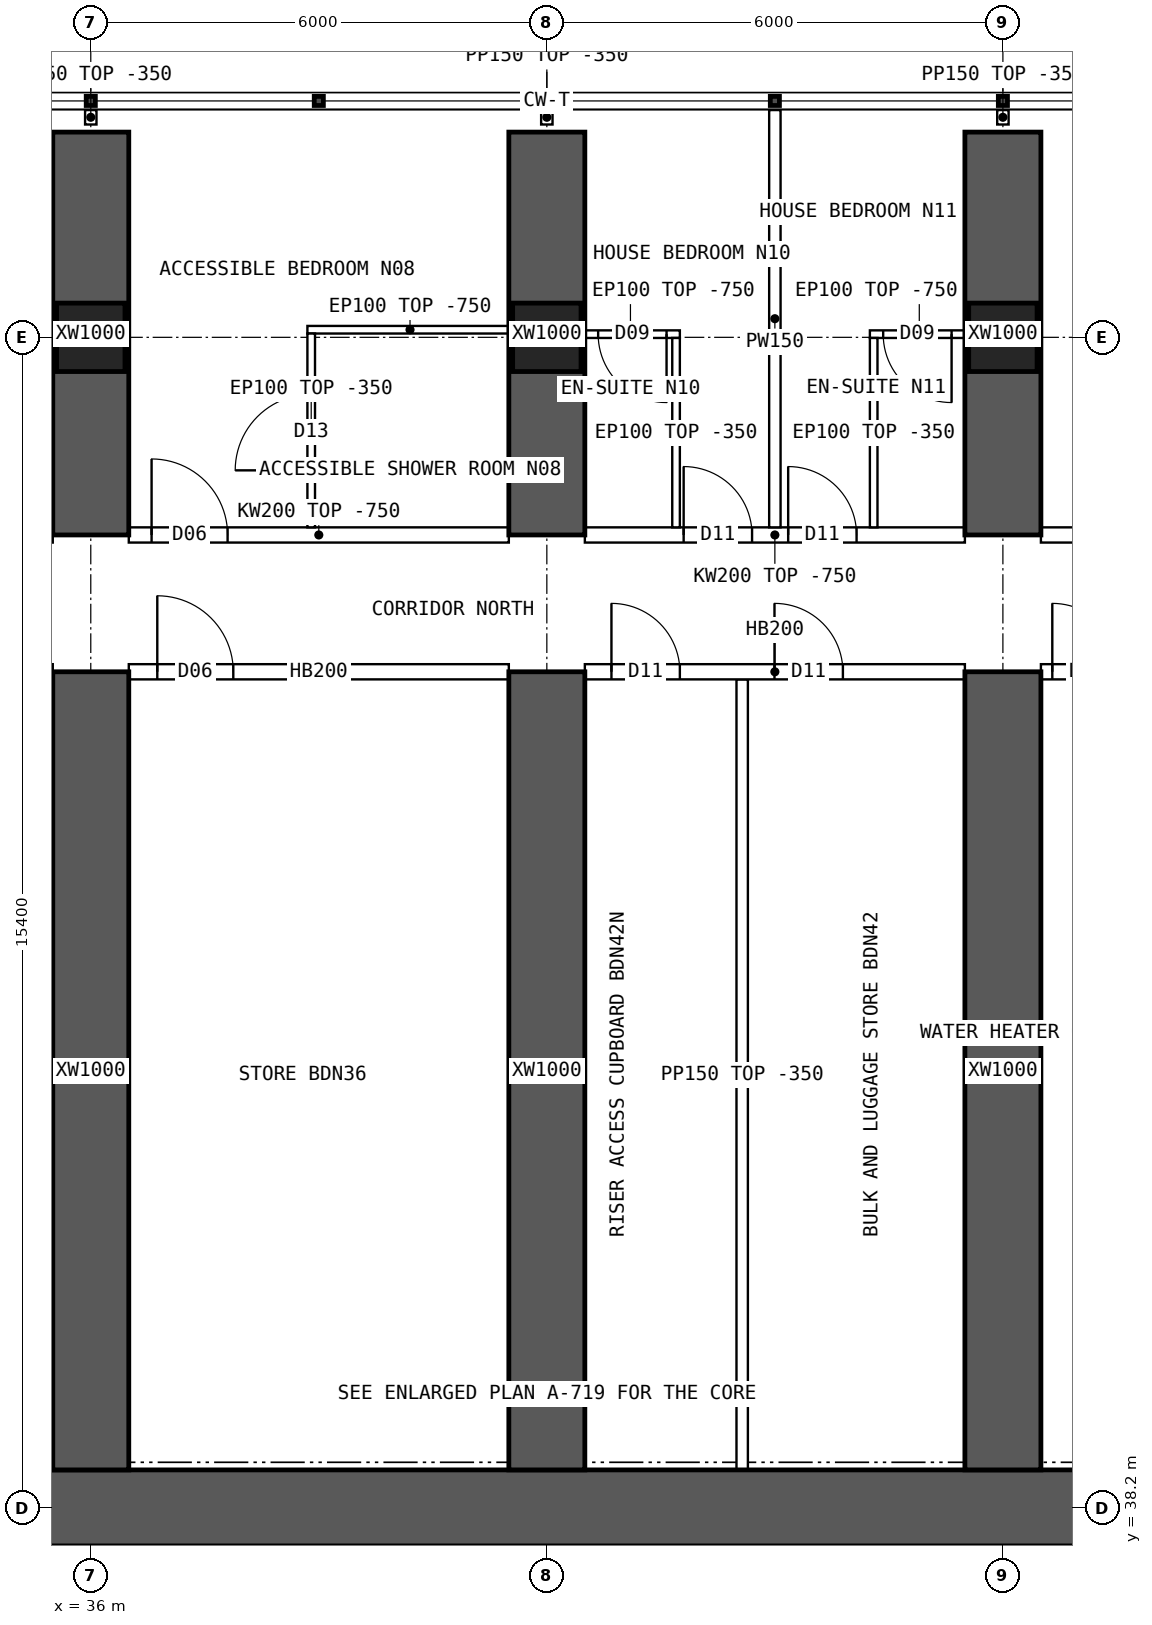
"""IFC4 building model, lengths in metres.
Left out: names, types, materials, properties, quantities, classifications, styles, units other than length and angle.
Written with IfcOpenShell. Run it as: python <this file> out.ifc"""

import sys

from ifc_helpers import new_model, si_unit, direction, frame, frame_2d, origin, origin_2d, place, context, subcontext, project, spatial, polyline, rectangle, hollow_rectangle, outline, extrude, element, fill, save


model = new_model("IFC4")
c1 = context("Model", 3, precision=1e-05, world=origin(), true_north=direction((0.0, 1.0)))
c2 = subcontext(c1, "Body", "Model", "MODEL_VIEW")
j1 = project(units=[si_unit("LENGTHUNIT", "METRE"), si_unit("PLANEANGLEUNIT", "RADIAN")], contexts=[c1])
p1 = place(None, origin())
s1 = spatial("IfcSite", under=j1, at=p1, CompositionType="ELEMENT")
p2 = place(p1, origin())
s2 = spatial("IfcBuilding", under=s1, at=p2, CompositionType="ELEMENT")
p3 = place(p2, frame((0.0, 0.0, 65.2)))
s3 = spatial("IfcBuildingStorey", under=s2, at=p3, CompositionType="ELEMENT", Elevation=65.2)
for number, where, z_axis, x_axis in (
    (1, (36.0, 53.6, 0.0), (0.0, 0.0, 1.0), (1.0, 0.0, 0.0)),
    (2, (42.0, 53.6, 0.0), (0.0, 0.0, 1.0), (1.0, 0.0, 0.0)),
    (3, (48.0, 53.6, 0.0), (0.0, 0.0, 1.0), (1.0, 0.0, 0.0)),
):
    element("IfcColumn", number, at=place(p3, frame(where, z_axis=z_axis, x_axis=x_axis)), inside=s3, PredefinedType="COLUMN", context=c2, shape_type="SweptSolid", body=[
        extrude(hollow_rectangle(XDim=0.9, YDim=0.9, WallThickness=0.09, at=origin_2d()), origin(), (0.0, 0.0, 1.0), 3.75),
    ])
p4 = place(p3, frame((18.0, 38.2, 0.0), z_axis=(0.0, 0.0, 1.0), x_axis=(1.0, 0.0, 0.0)))
e4 = element("IfcWall", 4, at=p4, inside=s3, PredefinedType="SHEAR", context=c2, shape_type="SweptSolid", body=[
    extrude(rectangle(XDim=48.0, YDim=1.0, at=frame_2d((24.0, 0.0))), origin(), (0.0, 0.0, 1.0), 3.75),
])
p5 = place(p3, frame((36.0, 51.0, 0.0), z_axis=(0.0, 0.0, 1.0), x_axis=(0.0, 1.0, 0.0)))
e5 = element("IfcWall", 5, at=p5, inside=s3, PredefinedType="SHEAR", context=c2, shape_type="SweptSolid", body=[
    extrude(rectangle(XDim=5.3, YDim=1.0, at=frame_2d((2.65, 0.0))), origin(), (0.0, 0.0, 1.0), 3.75),
])
p6 = place(p3, frame((36.0, 38.7, 0.0), z_axis=(0.0, 0.0, 1.0), x_axis=(0.0, 1.0, 0.0)))
e6 = element("IfcWall", 6, at=p6, inside=s3, PredefinedType="SHEAR", context=c2, shape_type="SweptSolid", body=[
    extrude(rectangle(XDim=10.5, YDim=1.0, at=frame_2d((5.25, 0.0))), origin(), (0.0, 0.0, 1.0), 3.75),
])
p7 = place(p3, frame((42.0, 51.0, 0.0), z_axis=(0.0, 0.0, 1.0), x_axis=(0.0, 1.0, 0.0)))
e7 = element("IfcWall", 7, at=p7, inside=s3, PredefinedType="SHEAR", context=c2, shape_type="SweptSolid", body=[
    extrude(rectangle(XDim=5.3, YDim=1.0, at=frame_2d((2.65, 0.0))), origin(), (0.0, 0.0, 1.0), 3.75),
])
p8 = place(p3, frame((42.0, 38.7, 0.0), z_axis=(0.0, 0.0, 1.0), x_axis=(0.0, 1.0, 0.0)))
e8 = element("IfcWall", 8, at=p8, inside=s3, PredefinedType="SHEAR", context=c2, shape_type="SweptSolid", body=[
    extrude(rectangle(XDim=10.5, YDim=1.0, at=frame_2d((5.25, 0.0))), origin(), (0.0, 0.0, 1.0), 3.75),
])
p9 = place(p3, frame((48.0, 51.0, 0.0), z_axis=(0.0, 0.0, 1.0), x_axis=(0.0, 1.0, 0.0)))
e9 = element("IfcWall", 9, at=p9, inside=s3, PredefinedType="SHEAR", context=c2, shape_type="SweptSolid", body=[
    extrude(rectangle(XDim=5.3, YDim=1.0, at=frame_2d((2.65, 0.0))), origin(), (0.0, 0.0, 1.0), 3.75),
])
p10 = place(p3, frame((48.0, 38.7, 0.0), z_axis=(0.0, 0.0, 1.0), x_axis=(0.0, 1.0, 0.0)))
e10 = element("IfcWall", 10, at=p10, inside=s3, PredefinedType="SHEAR", context=c2, shape_type="SweptSolid", body=[
    extrude(rectangle(XDim=10.5, YDim=1.0, at=frame_2d((5.25, 0.0))), origin(), (0.0, 0.0, 1.0), 3.75),
])
for number, where, z_axis, x_axis in (
    (11, (36.946, 34.75, 0.0), (0.0, 0.0, 1.0), (0.0, 1.0, 0.0)),
    (12, (41.463, 34.75, 0.0), (0.0, 0.0, 1.0), (0.0, 1.0, 0.0)),
    (13, (45.758, 34.75, 0.0), (0.0, 0.0, 1.0), (0.0, 1.0, 0.0)),
    (14, (47.058, 34.75, 0.0), (0.0, 0.0, 1.0), (0.0, 1.0, 0.0)),
):
    element("IfcWall", number, at=place(p3, frame(where, z_axis=z_axis, x_axis=x_axis)), inside=s3, PredefinedType="SOLIDWALL", context=c2, shape_type="SweptSolid", body=[
        extrude(rectangle(XDim=2.95, YDim=0.15, at=frame_2d((1.475, 0.0))), origin(), (0.0, 0.0, 1.0), 3.4),
    ])
p11 = place(p3, frame((36.5, 51.0, 0.0), z_axis=(0.0, 0.0, 1.0), x_axis=(1.0, 0.0, 0.0)))
e15 = element("IfcWall", 15, at=p11, inside=s3, PredefinedType="SOLIDWALL", context=c2, shape_type="SweptSolid", body=[
    extrude(outline(polyline([(0.0, 0.0), (5.0, 0.0), (5.0, 3.0), (0.0, 3.0), (0.0, 0.0)])), frame((0.0, 0.1, 0.0), z_axis=(0.0, -1.0, 0.0), x_axis=(1.0, 0.0, 0.0)), (0.0, 0.0, 1.0), 0.2),
])
p12 = place(p11, frame((0.3, 0.0, 0.0)))
e16 = element("IfcOpeningElement", 16, at=p12, cuts=e15, PredefinedType="OPENING", context=c2, shape_type="SweptSolid", body=[
    extrude(rectangle(XDim=1.0, YDim=2.1, at=frame_2d((0.5, 1.05))), frame((0.0, 0.11, 0.0), z_axis=(0.0, -1.0, 0.0), x_axis=(1.0, 0.0, 0.0)), (0.0, 0.0, 1.0), 0.22),
])
p13 = place(p3, frame((36.5, 49.2, 0.0), z_axis=(0.0, 0.0, 1.0), x_axis=(1.0, 0.0, 0.0)))
e17 = element("IfcWall", 17, at=p13, inside=s3, PredefinedType="SOLIDWALL", context=c2, shape_type="SweptSolid", body=[
    extrude(rectangle(XDim=5.0, YDim=0.2, at=frame_2d((2.5, 0.0))), origin(), (0.0, 0.0, 1.0), 3.4),
])
p14 = place(p13, frame((0.375, 0.0, 0.0)))
e18 = element("IfcOpeningElement", 18, at=p14, cuts=e17, PredefinedType="OPENING", context=c2, shape_type="SweptSolid", body=[
    extrude(rectangle(XDim=1.0, YDim=2.1, at=frame_2d((0.5, 1.05))), frame((0.0, 0.11, 0.0), z_axis=(0.0, -1.0, 0.0), x_axis=(1.0, 0.0, 0.0)), (0.0, 0.0, 1.0), 0.22),
])
p15 = place(p3, frame((42.5, 51.0, 0.0), z_axis=(0.0, 0.0, 1.0), x_axis=(1.0, 0.0, 0.0)))
e19 = element("IfcWall", 19, at=p15, inside=s3, PredefinedType="SOLIDWALL", context=c2, shape_type="SweptSolid", body=[
    extrude(outline(polyline([(0.0, 0.0), (5.0, 0.0), (5.0, 3.0), (0.0, 3.0), (0.0, 0.0)])), frame((0.0, 0.1, 0.0), z_axis=(0.0, -1.0, 0.0), x_axis=(1.0, 0.0, 0.0)), (0.0, 0.0, 1.0), 0.2),
])
p16 = place(p15, frame((1.3, 0.0, 0.0)))
e20 = element("IfcOpeningElement", 20, at=p16, cuts=e19, PredefinedType="OPENING", context=c2, shape_type="SweptSolid", body=[
    extrude(rectangle(XDim=0.9, YDim=2.1, at=frame_2d((0.45, 1.05))), frame((0.0, 0.11, 0.0), z_axis=(0.0, -1.0, 0.0), x_axis=(1.0, 0.0, 0.0)), (0.0, 0.0, 1.0), 0.22),
])
p17 = place(p15, frame((2.675, 0.0, 0.0)))
e21 = element("IfcOpeningElement", 21, at=p17, cuts=e19, PredefinedType="OPENING", context=c2, shape_type="SweptSolid", body=[
    extrude(rectangle(XDim=0.9, YDim=2.1, at=frame_2d((0.45, 1.05))), frame((0.0, 0.11, 0.0), z_axis=(0.0, -1.0, 0.0), x_axis=(1.0, 0.0, 0.0)), (0.0, 0.0, 1.0), 0.22),
])
p18 = place(p3, frame((42.5, 49.2, 0.0), z_axis=(0.0, 0.0, 1.0), x_axis=(1.0, 0.0, 0.0)))
e22 = element("IfcWall", 22, at=p18, inside=s3, PredefinedType="SOLIDWALL", context=c2, shape_type="SweptSolid", body=[
    extrude(rectangle(XDim=5.0, YDim=0.2, at=frame_2d((2.5, 0.0))), origin(), (0.0, 0.0, 1.0), 3.4),
])
p19 = place(p18, frame((0.35, 0.0, 0.0)))
e23 = element("IfcOpeningElement", 23, at=p19, cuts=e22, PredefinedType="OPENING", context=c2, shape_type="SweptSolid", body=[
    extrude(rectangle(XDim=0.9, YDim=2.1, at=frame_2d((0.45, 1.05))), frame((0.0, 0.11, 0.0), z_axis=(0.0, -1.0, 0.0), x_axis=(1.0, 0.0, 0.0)), (0.0, 0.0, 1.0), 0.22),
])
p20 = place(p18, frame((2.495, 0.0, 0.0)))
e24 = element("IfcOpeningElement", 24, at=p20, cuts=e22, PredefinedType="OPENING", context=c2, shape_type="SweptSolid", body=[
    extrude(rectangle(XDim=0.9, YDim=2.1, at=frame_2d((0.45, 1.05))), frame((0.0, 0.11, 0.0), z_axis=(0.0, -1.0, 0.0), x_axis=(1.0, 0.0, 0.0)), (0.0, 0.0, 1.0), 0.22),
])
p21 = place(p3, frame((48.5, 51.0, 0.0), z_axis=(0.0, 0.0, 1.0), x_axis=(1.0, 0.0, 0.0)))
e25 = element("IfcWall", 25, at=p21, inside=s3, PredefinedType="SOLIDWALL", context=c2, shape_type="SweptSolid", body=[
    extrude(outline(polyline([(0.0, 0.0), (5.0, 0.0), (5.0, 3.0), (0.0, 3.0), (0.0, 0.0)])), frame((0.0, 0.1, 0.0), z_axis=(0.0, -1.0, 0.0), x_axis=(1.0, 0.0, 0.0)), (0.0, 0.0, 1.0), 0.2),
])
p22 = place(p21, frame((0.6, 0.0, 0.0)))
e26 = element("IfcOpeningElement", 26, at=p22, cuts=e25, PredefinedType="OPENING", context=c2, shape_type="SweptSolid", body=[
    extrude(rectangle(XDim=1.0, YDim=2.1, at=frame_2d((0.5, 1.05))), frame((0.0, 0.11, 0.0), z_axis=(0.0, -1.0, 0.0), x_axis=(1.0, 0.0, 0.0)), (0.0, 0.0, 1.0), 0.22),
])
p23 = place(p3, frame((48.5, 49.2, 0.0), z_axis=(0.0, 0.0, 1.0), x_axis=(1.0, 0.0, 0.0)))
e27 = element("IfcWall", 27, at=p23, inside=s3, PredefinedType="SOLIDWALL", context=c2, shape_type="SweptSolid", body=[
    extrude(rectangle(XDim=5.0, YDim=0.2, at=frame_2d((2.5, 0.0))), origin(), (0.0, 0.0, 1.0), 3.4),
])
p24 = place(p23, frame((0.15, 0.0, 0.0)))
e28 = element("IfcOpeningElement", 28, at=p24, cuts=e27, PredefinedType="OPENING", context=c2, shape_type="SweptSolid", body=[
    extrude(rectangle(XDim=0.9, YDim=2.1, at=frame_2d((0.45, 1.05))), frame((0.0, 0.11, 0.0), z_axis=(0.0, -1.0, 0.0), x_axis=(1.0, 0.0, 0.0)), (0.0, 0.0, 1.0), 0.22),
])
p25 = place(p23, frame((2.02, 0.0, 0.0)))
e29 = element("IfcOpeningElement", 29, at=p25, cuts=e27, PredefinedType="OPENING", context=c2, shape_type="SweptSolid", body=[
    extrude(rectangle(XDim=0.9, YDim=2.1, at=frame_2d((0.45, 1.05))), frame((0.0, 0.11, 0.0), z_axis=(0.0, -1.0, 0.0), x_axis=(1.0, 0.0, 0.0)), (0.0, 0.0, 1.0), 0.22),
])
p26 = place(p3, frame((38.85, 53.7, 0.0), z_axis=(0.0, 0.0, 1.0), x_axis=(1.0, 0.0, 0.0)))
e30 = element("IfcWall", 30, at=p26, inside=s3, PredefinedType="PARTITIONING", context=c2, shape_type="SweptSolid", body=[
    extrude(outline(polyline([(0.0, 0.0), (2.7, 0.0), (2.7, 3.0), (0.0, 3.0), (0.0, 0.0)])), frame((0.0, 0.05, 0.0), z_axis=(0.0, -1.0, 0.0), x_axis=(1.0, 0.0, 0.0)), (0.0, 0.0, 1.0), 0.1),
])
p27 = place(p3, frame((38.9, 53.65, 0.0), z_axis=(0.0, 0.0, 1.0), x_axis=(0.0, -1.0, 0.0)))
e31 = element("IfcWall", 31, at=p27, inside=s3, PredefinedType="PARTITIONING", context=c2, shape_type="SweptSolid", body=[
    extrude(outline(polyline([(0.0, 0.0), (2.55, 0.0), (2.55, 3.0), (2.502, 3.0), (2.5, 3.4), (0.252, 3.4), (0.25, 3.0), (0.0, 3.0), (0.0, 0.0)])), frame((0.0, 0.05, 0.0), z_axis=(0.0, -1.0, 0.0), x_axis=(1.0, 0.0, 0.0)), (0.0, 0.0, 1.0), 0.1),
])
p28 = place(p27, frame((0.8, 0.0, 0.0)))
e32 = element("IfcOpeningElement", 32, at=p28, cuts=e31, PredefinedType="OPENING", context=c2, shape_type="SweptSolid", body=[
    extrude(rectangle(XDim=1.0, YDim=2.1, at=frame_2d((0.5, 1.05))), frame((0.0, 0.06, 0.0), z_axis=(0.0, -1.0, 0.0), x_axis=(1.0, 0.0, 0.0)), (0.0, 0.0, 1.0), 0.12),
])
p29 = place(p3, frame((45.0, 56.59, 0.0), z_axis=(0.0, 0.0, 1.0), x_axis=(0.0, -1.0, 0.0)))
e33 = element("IfcWall", 33, at=p29, inside=s3, PredefinedType="PARTITIONING", context=c2, shape_type="SweptSolid", body=[
    extrude(outline(polyline([(0.0, 0.0), (5.49, 0.0), (5.49, 3.0), (5.442, 3.0), (5.44, 3.4), (3.192, 3.4), (3.19, 3.0), (2.792, 3.0), (2.79, 3.4), (0.0, 3.4), (0.0, 0.0)])), frame((0.0, 0.075, 0.0), z_axis=(0.0, -1.0, 0.0), x_axis=(1.0, 0.0, 0.0)), (0.0, 0.0, 1.0), 0.15),
])
p30 = place(p3, frame((42.45, 53.642, 0.0), z_axis=(0.0, 0.0, 1.0), x_axis=(1.0, 0.0, 0.0)))
e34 = element("IfcWall", 34, at=p30, inside=s3, PredefinedType="PARTITIONING", context=c2, shape_type="SweptSolid", body=[
    extrude(outline(polyline([(0.0, 0.0), (1.3, 0.0), (1.3, 3.0), (0.0, 3.0), (0.0, 0.0)])), frame((0.0, 0.05, 0.0), z_axis=(0.0, -1.0, 0.0), x_axis=(1.0, 0.0, 0.0)), (0.0, 0.0, 1.0), 0.1),
])
p31 = place(p30, frame((0.225, 0.0, 0.0)))
e35 = element("IfcOpeningElement", 35, at=p31, cuts=e34, PredefinedType="OPENING", context=c2, shape_type="SweptSolid", body=[
    extrude(rectangle(XDim=0.9, YDim=2.1, at=frame_2d((0.45, 1.05))), frame((0.0, 0.06, 0.0), z_axis=(0.0, -1.0, 0.0), x_axis=(1.0, 0.0, 0.0)), (0.0, 0.0, 1.0), 0.12),
])
p32 = place(p3, frame((43.7, 53.592, 0.0), z_axis=(0.0, 0.0, 1.0), x_axis=(0.0, -1.0, 0.0)))
e36 = element("IfcWall", 36, at=p32, inside=s3, PredefinedType="PARTITIONING", context=c2, shape_type="SweptSolid", body=[
    extrude(outline(polyline([(0.0, 0.0), (2.492, 0.0), (2.492, 3.0), (2.444, 3.0), (2.442, 3.4), (0.194, 3.4), (0.192, 3.0), (0.0, 3.0), (0.0, 0.0)])), frame((0.0, 0.05, 0.0), z_axis=(0.0, -1.0, 0.0), x_axis=(1.0, 0.0, 0.0)), (0.0, 0.0, 1.0), 0.1),
])
p33 = place(p3, frame((46.25, 53.642, 0.0), z_axis=(0.0, 0.0, 1.0), x_axis=(1.0, 0.0, 0.0)))
e37 = element("IfcWall", 37, at=p33, inside=s3, PredefinedType="PARTITIONING", context=c2, shape_type="SweptSolid", body=[
    extrude(outline(polyline([(0.0, 0.0), (1.3, 0.0), (1.3, 3.0), (0.0, 3.0), (0.0, 0.0)])), frame((0.0, 0.05, 0.0), z_axis=(0.0, -1.0, 0.0), x_axis=(1.0, 0.0, 0.0)), (0.0, 0.0, 1.0), 0.1),
])
p34 = place(p33, frame((0.175, 0.0, 0.0)))
e38 = element("IfcOpeningElement", 38, at=p34, cuts=e37, PredefinedType="OPENING", context=c2, shape_type="SweptSolid", body=[
    extrude(rectangle(XDim=0.9, YDim=2.1, at=frame_2d((0.45, 1.05))), frame((0.0, 0.06, 0.0), z_axis=(0.0, -1.0, 0.0), x_axis=(1.0, 0.0, 0.0)), (0.0, 0.0, 1.0), 0.12),
])
p35 = place(p3, frame((46.3, 53.592, 0.0), z_axis=(0.0, 0.0, 1.0), x_axis=(0.0, -1.0, 0.0)))
e39 = element("IfcWall", 39, at=p35, inside=s3, PredefinedType="PARTITIONING", context=c2, shape_type="SweptSolid", body=[
    extrude(outline(polyline([(0.0, 0.0), (2.492, 0.0), (2.492, 3.0), (2.444, 3.0), (2.442, 3.4), (0.194, 3.4), (0.192, 3.0), (0.0, 3.0), (0.0, 0.0)])), frame((0.0, 0.05, 0.0), z_axis=(0.0, -1.0, 0.0), x_axis=(1.0, 0.0, 0.0)), (0.0, 0.0, 1.0), 0.1),
])
p36 = place(p3, frame((44.57, 38.7, 0.0), z_axis=(0.0, 0.0, 1.0), x_axis=(0.0, 1.0, 0.0)))
e40 = element("IfcWall", 40, at=p36, inside=s3, PredefinedType="PARTITIONING", context=c2, shape_type="SweptSolid", body=[
    extrude(rectangle(XDim=10.4, YDim=0.15, at=frame_2d((5.2, 0.0))), origin(), (0.0, 0.0, 1.0), 3.4),
])
for number, where, z_axis, x_axis in (
    (41, (36.0, 56.4, 0.0), (0.0, 0.0, 1.0), (0.0, 1.0, 0.0)),
    (42, (42.0, 56.4, 0.0), (0.0, 0.0, 1.0), (0.0, 1.0, 0.0)),
    (43, (48.0, 56.4, 0.0), (0.0, 0.0, 1.0), (0.0, 1.0, 0.0)),
):
    element("IfcWall", number, at=place(p3, frame(where, z_axis=z_axis, x_axis=x_axis)), inside=s3, PredefinedType="PARTITIONING", context=c2, shape_type="SweptSolid", body=[
        extrude(rectangle(XDim=0.19, YDim=0.15, at=frame_2d((0.095, 0.0))), origin(), (0.0, 0.0, 1.0), 3.4),
    ])
p37 = place(p28, origin())
e44 = element("IfcDoor", 44, at=p37, inside=s3, OperationType="SINGLE_SWING_RIGHT", PredefinedType="DOOR", context=c2, shape_type="SweptSolid", body=[
    extrude(rectangle(XDim=1.0, YDim=2.1, at=frame_2d((0.5, 1.05))), frame((0.0, 0.025, 0.0), z_axis=(0.0, -1.0, 0.0), x_axis=(1.0, 0.0, 0.0)), (0.0, 0.0, 1.0), 0.05),
])
fill(e32, e44)
p38 = place(p12, origin())
e45 = element("IfcDoor", 45, at=p38, inside=s3, OperationType="SINGLE_SWING_LEFT", PredefinedType="DOOR", context=c2, shape_type="SweptSolid", body=[
    extrude(rectangle(XDim=1.0, YDim=2.1, at=frame_2d((0.5, 1.05))), frame((0.0, 0.025, 0.0), z_axis=(0.0, -1.0, 0.0), x_axis=(1.0, 0.0, 0.0)), (0.0, 0.0, 1.0), 0.05),
])
fill(e16, e45)
p39 = place(p31, origin())
e46 = element("IfcDoor", 46, at=p39, inside=s3, OperationType="SINGLE_SWING_RIGHT", PredefinedType="DOOR", context=c2, shape_type="SweptSolid", body=[
    extrude(rectangle(XDim=0.9, YDim=2.1, at=frame_2d((0.45, 1.05))), frame((0.0, 0.025, 0.0), z_axis=(0.0, -1.0, 0.0), x_axis=(1.0, 0.0, 0.0)), (0.0, 0.0, 1.0), 0.05),
])
fill(e35, e46)
p40 = place(p16, origin())
e47 = element("IfcDoor", 47, at=p40, inside=s3, OperationType="SINGLE_SWING_LEFT", PredefinedType="DOOR", context=c2, shape_type="SweptSolid", body=[
    extrude(rectangle(XDim=0.9, YDim=2.1, at=frame_2d((0.45, 1.05))), frame((0.0, 0.025, 0.0), z_axis=(0.0, -1.0, 0.0), x_axis=(1.0, 0.0, 0.0)), (0.0, 0.0, 1.0), 0.05),
])
fill(e20, e47)
p41 = place(p34, origin())
e48 = element("IfcDoor", 48, at=p41, inside=s3, OperationType="SINGLE_SWING_RIGHT", PredefinedType="DOOR", context=c2, shape_type="SweptSolid", body=[
    extrude(rectangle(XDim=0.9, YDim=2.1, at=frame_2d((0.45, 1.05))), frame((0.0, 0.025, 0.0), z_axis=(0.0, -1.0, 0.0), x_axis=(1.0, 0.0, 0.0)), (0.0, 0.0, 1.0), 0.05),
])
fill(e38, e48)
p42 = place(p17, origin())
e49 = element("IfcDoor", 49, at=p42, inside=s3, OperationType="SINGLE_SWING_LEFT", PredefinedType="DOOR", context=c2, shape_type="SweptSolid", body=[
    extrude(rectangle(XDim=0.9, YDim=2.1, at=frame_2d((0.45, 1.05))), frame((0.0, 0.025, 0.0), z_axis=(0.0, -1.0, 0.0), x_axis=(1.0, 0.0, 0.0)), (0.0, 0.0, 1.0), 0.05),
])
fill(e21, e49)
p43 = place(p14, origin())
e50 = element("IfcDoor", 50, at=p43, inside=s3, OperationType="SINGLE_SWING_LEFT", PredefinedType="DOOR", context=c2, shape_type="SweptSolid", body=[
    extrude(rectangle(XDim=1.0, YDim=2.1, at=frame_2d((0.5, 1.05))), frame((0.0, 0.025, 0.0), z_axis=(0.0, -1.0, 0.0), x_axis=(1.0, 0.0, 0.0)), (0.0, 0.0, 1.0), 0.05),
])
fill(e18, e50)
p44 = place(p19, origin())
e51 = element("IfcDoor", 51, at=p44, inside=s3, OperationType="SINGLE_SWING_LEFT", PredefinedType="DOOR", context=c2, shape_type="SweptSolid", body=[
    extrude(rectangle(XDim=0.9, YDim=2.1, at=frame_2d((0.45, 1.05))), frame((0.0, 0.025, 0.0), z_axis=(0.0, -1.0, 0.0), x_axis=(1.0, 0.0, 0.0)), (0.0, 0.0, 1.0), 0.05),
])
fill(e23, e51)
p45 = place(p20, origin())
e52 = element("IfcDoor", 52, at=p45, inside=s3, OperationType="SINGLE_SWING_LEFT", PredefinedType="DOOR", context=c2, shape_type="SweptSolid", body=[
    extrude(rectangle(XDim=0.9, YDim=2.1, at=frame_2d((0.45, 1.05))), frame((0.0, 0.025, 0.0), z_axis=(0.0, -1.0, 0.0), x_axis=(1.0, 0.0, 0.0)), (0.0, 0.0, 1.0), 0.05),
])
fill(e24, e52)
p46 = place(p24, origin())
e53 = element("IfcDoor", 53, at=p46, inside=s3, OperationType="SINGLE_SWING_LEFT", PredefinedType="DOOR", context=c2, shape_type="SweptSolid", body=[
    extrude(rectangle(XDim=0.9, YDim=2.1, at=frame_2d((0.45, 1.05))), frame((0.0, 0.025, 0.0), z_axis=(0.0, -1.0, 0.0), x_axis=(1.0, 0.0, 0.0)), (0.0, 0.0, 1.0), 0.05),
])
fill(e28, e53)
save(model, sys.argv[1])
